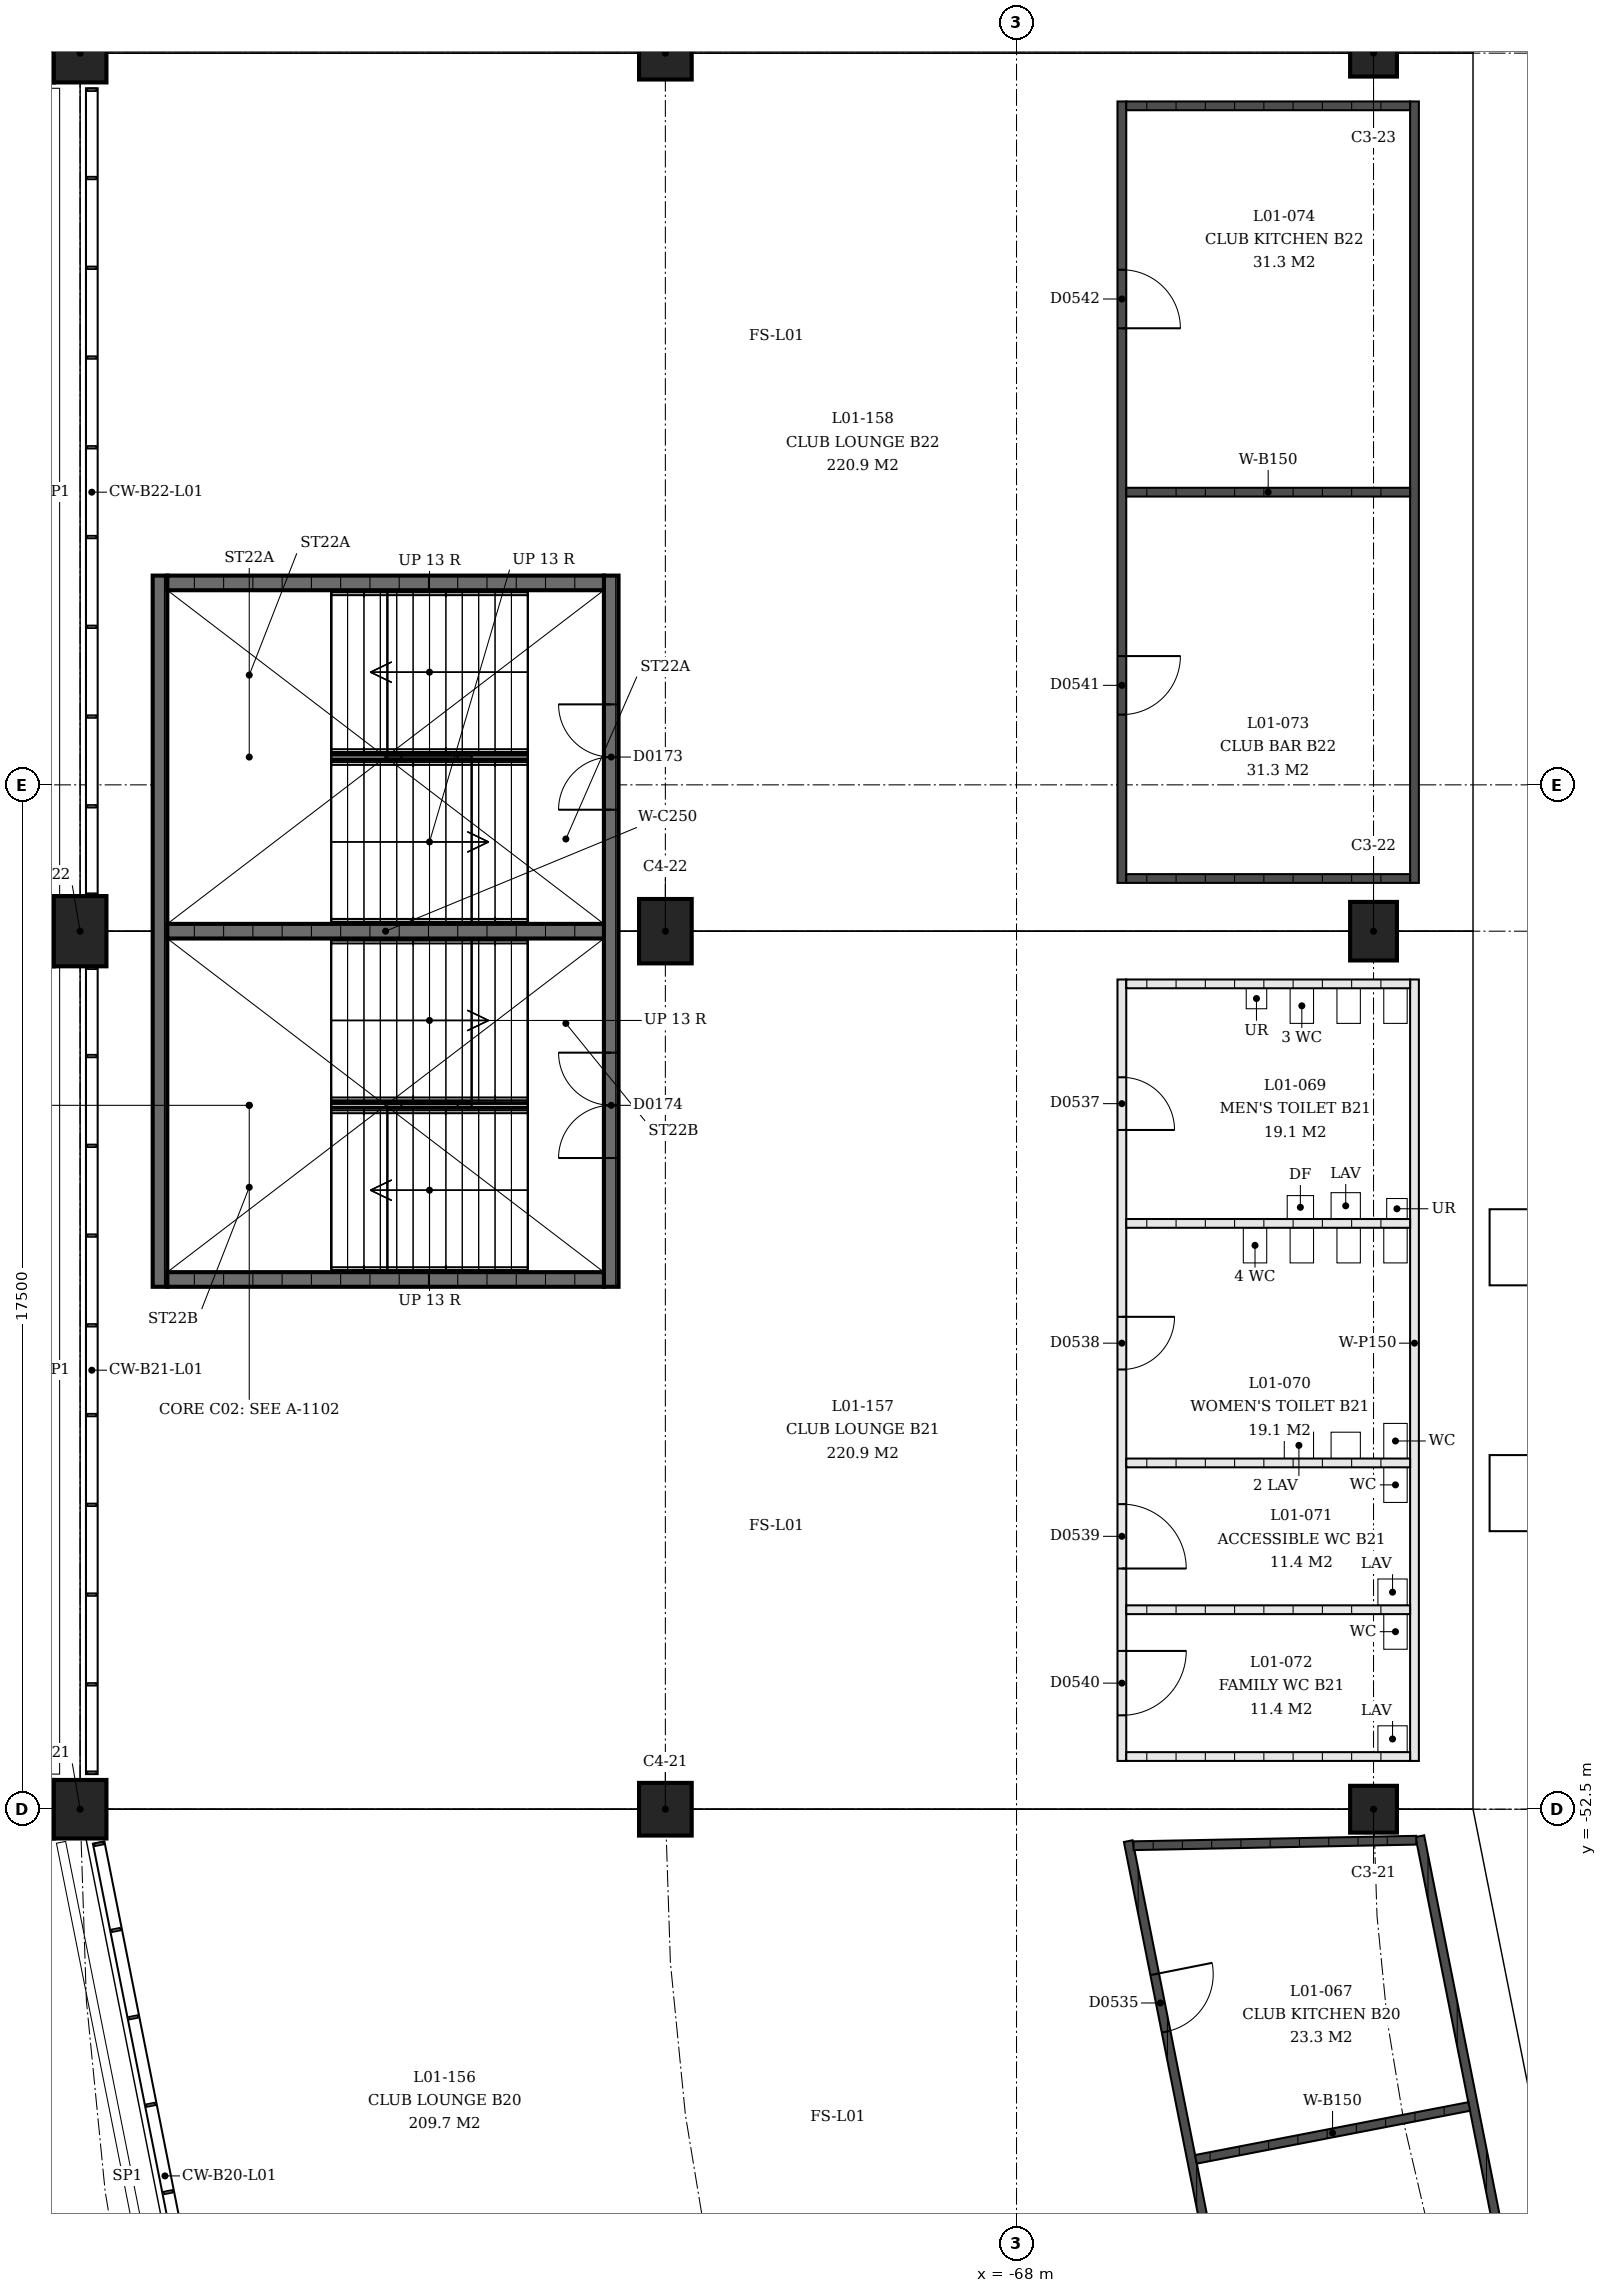
"""IFC4 building model, lengths in metres.
Left out: names, types, materials, properties, quantities, classifications, styles, units other than length and angle.
Written with IfcOpenShell. Run it as: python <this file> out.ifc"""

import sys

from ifc_helpers import new_model, si_unit, direction, frame, frame_2d, origin, origin_2d, place, context, subcontext, project, spatial, rectangle, extrude, element, fill, save


model = new_model("IFC4")
c1 = context("Model", 3, precision=1e-05, world=origin(), true_north=direction((0.0, 1.0)))
c2 = subcontext(c1, "Body", "Model", "MODEL_VIEW")
j1 = project(units=[si_unit("LENGTHUNIT", "METRE"), si_unit("PLANEANGLEUNIT", "RADIAN")], contexts=[c1])
p1 = place(None, origin())
s1 = spatial("IfcSite", under=j1, at=p1, CompositionType="ELEMENT")
p2 = place(p1, origin())
s2 = spatial("IfcBuilding", under=s1, at=p2, CompositionType="ELEMENT")
p3 = place(p2, frame((0.0, 0.0, 4.5)))
s3 = spatial("IfcBuildingStorey", under=s2, at=p3, CompositionType="ELEMENT", Elevation=4.5)
p4 = place(p3, frame((-61.9, -52.5, 0.0), z_axis=(0.0, 0.0, 1.0), x_axis=(0.0, -1.0, 0.0)))
e1 = element("IfcColumn", 1, at=p4, inside=s3, PredefinedType="COLUMN", context=c2, shape_type="SweptSolid", body=[
    extrude(rectangle(XDim=0.8, YDim=0.8, at=origin_2d()), origin(), (0.0, 0.0, 1.0), 4.5),
])
p5 = place(p3, frame((-74.0, -52.5, 0.0), z_axis=(0.0, 0.0, 1.0), x_axis=(0.0, -1.0, 0.0)))
e2 = element("IfcColumn", 2, at=p5, inside=s3, PredefinedType="COLUMN", context=c2, shape_type="SweptSolid", body=[
    extrude(rectangle(XDim=0.9, YDim=0.9, at=origin_2d()), origin(), (0.0, 0.0, 1.0), 4.5),
])
p6 = place(p3, frame((-84.0, -52.5, 0.0), z_axis=(0.0, 0.0, 1.0), x_axis=(0.0, -1.0, 0.0)))
e3 = element("IfcColumn", 3, at=p6, inside=s3, PredefinedType="COLUMN", context=c2, shape_type="SweptSolid", body=[
    extrude(rectangle(XDim=1.0, YDim=0.9, at=origin_2d()), origin(), (0.0, 0.0, 1.0), 4.5),
])
p7 = place(p3, frame((-61.9, -37.5, 0.0), z_axis=(0.0, 0.0, 1.0), x_axis=(0.0, -1.0, 0.0)))
e4 = element("IfcColumn", 4, at=p7, inside=s3, PredefinedType="COLUMN", context=c2, shape_type="SweptSolid", body=[
    extrude(rectangle(XDim=1.0, YDim=0.8, at=origin_2d()), origin(), (0.0, 0.0, 1.0), 4.5),
])
p8 = place(p3, frame((-74.0, -37.5, 0.0), z_axis=(0.0, 0.0, 1.0), x_axis=(0.0, -1.0, 0.0)))
e5 = element("IfcColumn", 5, at=p8, inside=s3, PredefinedType="COLUMN", context=c2, shape_type="SweptSolid", body=[
    extrude(rectangle(XDim=1.1, YDim=0.9, at=origin_2d()), origin(), (0.0, 0.0, 1.0), 4.5),
])
p9 = place(p3, frame((-84.0, -37.5, 0.0), z_axis=(0.0, 0.0, 1.0), x_axis=(0.0, -1.0, 0.0)))
e6 = element("IfcColumn", 6, at=p9, inside=s3, PredefinedType="COLUMN", context=c2, shape_type="SweptSolid", body=[
    extrude(rectangle(XDim=1.2, YDim=0.9, at=origin_2d()), origin(), (0.0, 0.0, 1.0), 4.5),
])
p10 = place(p3, frame((-61.9, -22.5, 0.0), z_axis=(0.0, 0.0, 1.0), x_axis=(0.0, -1.0, 0.0)))
e7 = element("IfcColumn", 7, at=p10, inside=s3, PredefinedType="COLUMN", context=c2, shape_type="SweptSolid", body=[
    extrude(rectangle(XDim=0.8, YDim=0.8, at=origin_2d()), origin(), (0.0, 0.0, 1.0), 4.5),
])
p11 = place(p3, frame((-74.0, -22.5, 0.0), z_axis=(0.0, 0.0, 1.0), x_axis=(0.0, -1.0, 0.0)))
e8 = element("IfcColumn", 8, at=p11, inside=s3, PredefinedType="COLUMN", context=c2, shape_type="SweptSolid", body=[
    extrude(rectangle(XDim=0.9, YDim=0.9, at=origin_2d()), origin(), (0.0, 0.0, 1.0), 4.5),
])
p12 = place(p3, frame((-84.0, -22.5, 0.0), z_axis=(0.0, 0.0, 1.0), x_axis=(0.0, -1.0, 0.0)))
e9 = element("IfcColumn", 9, at=p12, inside=s3, PredefinedType="COLUMN", context=c2, shape_type="SweptSolid", body=[
    extrude(rectangle(XDim=1.0, YDim=0.9, at=origin_2d()), origin(), (0.0, 0.0, 1.0), 4.5),
])
p13 = place(p3, frame((-74.925, -31.425, 0.0), z_axis=(0.0, 0.0, 1.0), x_axis=(0.0, -1.0, 0.0)))
e10 = element("IfcWall", 10, at=p13, inside=s3, PredefinedType="SHEAR", context=c2, shape_type="SweptSolid", body=[
    extrude(rectangle(XDim=12.15, YDim=0.25, at=frame_2d((6.075, 0.0))), origin(), (0.0, 0.0, 1.0), 4.09),
])
p14 = place(p13, frame((2.2, 0.0, 0.0)))
e11 = element("IfcOpeningElement", 11, at=p14, cuts=e10, PredefinedType="OPENING", context=c2, shape_type="SweptSolid", body=[
    extrude(rectangle(XDim=1.8, YDim=2.1, at=frame_2d((0.9, 1.05))), frame((0.0, 0.125, 0.0), z_axis=(0.0, -1.0, 0.0), x_axis=(1.0, 0.0, 0.0)), (0.0, 0.0, 1.0), 0.25),
])
p15 = place(p13, frame((8.15, 0.0, 0.0)))
e12 = element("IfcOpeningElement", 12, at=p15, cuts=e10, PredefinedType="OPENING", context=c2, shape_type="SweptSolid", body=[
    extrude(rectangle(XDim=1.8, YDim=2.1, at=frame_2d((0.9, 1.05))), frame((0.0, 0.125, 0.0), z_axis=(0.0, -1.0, 0.0), x_axis=(1.0, 0.0, 0.0)), (0.0, 0.0, 1.0), 0.25),
])
p16 = place(p3, frame((-82.635, -31.425, 0.0), z_axis=(0.0, 0.0, 1.0), x_axis=(0.0, -1.0, 0.0)))
e13 = element("IfcWall", 13, at=p16, inside=s3, PredefinedType="SHEAR", context=c2, shape_type="SweptSolid", body=[
    extrude(rectangle(XDim=12.15, YDim=0.25, at=frame_2d((6.075, 0.0))), origin(), (0.0, 0.0, 1.0), 4.09),
])
for number, where, z_axis, x_axis in (
    (14, (-75.05, -31.55, 0.0), (0.0, 0.0, 1.0), (-1.0, 0.0, 0.0)),
    (15, (-75.05, -43.45, 0.0), (0.0, 0.0, 1.0), (-1.0, 0.0, 0.0)),
    (16, (-75.05, -37.5, 0.0), (0.0, 0.0, 1.0), (-1.0, 0.0, 0.0)),
):
    element("IfcWall", number, at=place(p3, frame(where, z_axis=z_axis, x_axis=x_axis)), inside=s3, PredefinedType="SHEAR", context=c2, shape_type="SweptSolid", body=[
        extrude(rectangle(XDim=7.46, YDim=0.25, at=frame_2d((3.73, 0.0))), origin(), (0.0, 0.0, 1.0), 4.09),
    ])
p17 = place(p3, frame((-59.277, -62.168, 0.0), z_axis=(0.0, 0.0, 1.0), x_axis=(-0.195100776204, 0.980783200878, 0.0)))
e17 = element("IfcWall", 17, at=p17, inside=s3, PredefinedType="SOLIDWALL", context=c2, shape_type="SweptSolid", body=[
    extrude(rectangle(XDim=9.388, YDim=0.15, at=frame_2d((4.694, 0.0))), origin(), (0.0, 0.0, 1.0), 3.0),
])
p18 = place(p3, frame((-63.923, -63.945, 0.0), z_axis=(0.0, 0.0, 1.0), x_axis=(-0.195102100298, 0.980782937484, 0.0)))
e18 = element("IfcWall", 18, at=p18, inside=s3, PredefinedType="SOLIDWALL", context=c2, shape_type="SweptSolid", body=[
    extrude(rectangle(XDim=11.113, YDim=0.15, at=frame_2d((5.557, 0.0))), origin(), (0.0, 0.0, 1.0), 3.0),
])
p19 = place(p18, frame((2.319, 0.0, 0.0)))
e19 = element("IfcOpeningElement", 19, at=p19, cuts=e18, PredefinedType="OPENING", context=c2, shape_type="SweptSolid", body=[
    extrude(rectangle(XDim=1.0, YDim=2.1, at=frame_2d((0.5, 1.05))), frame((0.0, 0.075, 0.0), z_axis=(0.0, -1.0, 0.0), x_axis=(1.0, 0.0, 0.0)), (0.0, 0.0, 1.0), 0.15),
])
p20 = place(p18, frame((7.794, 0.0, 0.0)))
e20 = element("IfcOpeningElement", 20, at=p20, cuts=e18, PredefinedType="OPENING", context=c2, shape_type="SweptSolid", body=[
    extrude(rectangle(XDim=1.0, YDim=2.1, at=frame_2d((0.5, 1.05))), frame((0.0, 0.075, 0.0), z_axis=(0.0, -1.0, 0.0), x_axis=(1.0, 0.0, 0.0)), (0.0, 0.0, 1.0), 0.15),
])
p21 = place(p3, frame((-60.265, -57.578, 0.0), z_axis=(0.0, 0.0, 1.0), x_axis=(-0.981823683867, -0.189795294456, 0.0)))
e21 = element("IfcWall", 21, at=p21, inside=s3, PredefinedType="SOLIDWALL", context=c2, shape_type="SweptSolid", body=[
    extrude(rectangle(XDim=4.757, YDim=0.15, at=frame_2d((2.378, 0.0))), origin(), (0.0, 0.0, 1.0), 3.0),
])
p22 = place(p3, frame((-61.17, -53.03, 0.0), z_axis=(0.0, 0.0, 1.0), x_axis=(-0.999810800275, -0.01945157199, 0.0)))
e22 = element("IfcWall", 22, at=p22, inside=s3, PredefinedType="SOLIDWALL", context=c2, shape_type="SweptSolid", body=[
    extrude(rectangle(XDim=4.832, YDim=0.15, at=frame_2d((2.416, 0.0))), origin(), (0.0, 0.0, 1.0), 3.0),
])
p23 = place(p3, frame((-61.2, -38.325, 0.0), z_axis=(0.0, 0.0, 1.0), x_axis=(0.0, -1.0, 0.0)))
e23 = element("IfcWall", 23, at=p23, inside=s3, PredefinedType="PARTITIONING", context=c2, shape_type="SweptSolid", body=[
    extrude(rectangle(XDim=13.35, YDim=0.15, at=frame_2d((6.675, 0.0))), origin(), (0.0, 0.0, 1.0), 3.0),
])
p24 = place(p3, frame((-66.2, -38.325, 0.0), z_axis=(0.0, 0.0, 1.0), x_axis=(0.0, -1.0, 0.0)))
e24 = element("IfcWall", 24, at=p24, inside=s3, PredefinedType="PARTITIONING", context=c2, shape_type="SweptSolid", body=[
    extrude(rectangle(XDim=13.35, YDim=0.15, at=frame_2d((6.675, 0.0))), origin(), (0.0, 0.0, 1.0), 3.0),
])
p25 = place(p24, frame((1.671, 0.0, 0.0)))
e25 = element("IfcOpeningElement", 25, at=p25, cuts=e24, PredefinedType="OPENING", context=c2, shape_type="SweptSolid", body=[
    extrude(rectangle(XDim=0.9, YDim=2.1, at=frame_2d((0.45, 1.05))), frame((0.0, 0.075, 0.0), z_axis=(0.0, -1.0, 0.0), x_axis=(1.0, 0.0, 0.0)), (0.0, 0.0, 1.0), 0.15),
])
p26 = place(p24, frame((5.763, 0.0, 0.0)))
e26 = element("IfcOpeningElement", 26, at=p26, cuts=e24, PredefinedType="OPENING", context=c2, shape_type="SweptSolid", body=[
    extrude(rectangle(XDim=0.9, YDim=2.1, at=frame_2d((0.45, 1.05))), frame((0.0, 0.075, 0.0), z_axis=(0.0, -1.0, 0.0), x_axis=(1.0, 0.0, 0.0)), (0.0, 0.0, 1.0), 0.15),
])
p27 = place(p24, frame((8.963, 0.0, 0.0)))
e27 = element("IfcOpeningElement", 27, at=p27, cuts=e24, PredefinedType="OPENING", context=c2, shape_type="SweptSolid", body=[
    extrude(rectangle(XDim=1.1, YDim=2.1, at=frame_2d((0.55, 1.05))), frame((0.0, 0.075, 0.0), z_axis=(0.0, -1.0, 0.0), x_axis=(1.0, 0.0, 0.0)), (0.0, 0.0, 1.0), 0.15),
])
p28 = place(p24, frame((11.471, 0.0, 0.0)))
e28 = element("IfcOpeningElement", 28, at=p28, cuts=e24, PredefinedType="OPENING", context=c2, shape_type="SweptSolid", body=[
    extrude(rectangle(XDim=1.1, YDim=2.1, at=frame_2d((0.55, 1.05))), frame((0.0, 0.075, 0.0), z_axis=(0.0, -1.0, 0.0), x_axis=(1.0, 0.0, 0.0)), (0.0, 0.0, 1.0), 0.15),
])
for number, where, z_axis, x_axis in (
    (29, (-61.275, -38.4, 0.0), (0.0, 0.0, 1.0), (-1.0, 0.0, 0.0)),
    (30, (-61.275, -42.492, 0.0), (0.0, 0.0, 1.0), (-1.0, 0.0, 0.0)),
    (31, (-61.275, -46.584, 0.0), (0.0, 0.0, 1.0), (-1.0, 0.0, 0.0)),
    (32, (-61.275, -49.092, 0.0), (0.0, 0.0, 1.0), (-1.0, 0.0, 0.0)),
    (33, (-61.275, -51.6, 0.0), (0.0, 0.0, 1.0), (-1.0, 0.0, 0.0)),
):
    element("IfcWall", number, at=place(p3, frame(where, z_axis=z_axis, x_axis=x_axis)), inside=s3, PredefinedType="PARTITIONING", context=c2, shape_type="SweptSolid", body=[
        extrude(rectangle(XDim=4.85, YDim=0.15, at=frame_2d((2.425, 0.0))), origin(), (0.0, 0.0, 1.0), 3.0),
    ])
p29 = place(p3, frame((-61.2, -36.675, 0.0), z_axis=(0.0, 0.0, 1.0), x_axis=(0.0, 1.0, 0.0)))
e34 = element("IfcWall", 34, at=p29, inside=s3, PredefinedType="SOLIDWALL", context=c2, shape_type="SweptSolid", body=[
    extrude(rectangle(XDim=13.35, YDim=0.15, at=frame_2d((6.675, 0.0))), origin(), (0.0, 0.0, 1.0), 3.0),
])
p30 = place(p3, frame((-66.2, -36.675, 0.0), z_axis=(0.0, 0.0, 1.0), x_axis=(0.0, 1.0, 0.0)))
e35 = element("IfcWall", 35, at=p30, inside=s3, PredefinedType="SOLIDWALL", context=c2, shape_type="SweptSolid", body=[
    extrude(rectangle(XDim=13.35, YDim=0.15, at=frame_2d((6.675, 0.0))), origin(), (0.0, 0.0, 1.0), 3.0),
])
p31 = place(p30, frame((2.875, 0.0, 0.0)))
e36 = element("IfcOpeningElement", 36, at=p31, cuts=e35, PredefinedType="OPENING", context=c2, shape_type="SweptSolid", body=[
    extrude(rectangle(XDim=1.0, YDim=2.1, at=frame_2d((0.5, 1.05))), frame((0.0, 0.075, 0.0), z_axis=(0.0, -1.0, 0.0), x_axis=(1.0, 0.0, 0.0)), (0.0, 0.0, 1.0), 0.15),
])
p32 = place(p30, frame((9.475, 0.0, 0.0)))
e37 = element("IfcOpeningElement", 37, at=p32, cuts=e35, PredefinedType="OPENING", context=c2, shape_type="SweptSolid", body=[
    extrude(rectangle(XDim=1.0, YDim=2.1, at=frame_2d((0.5, 1.05))), frame((0.0, 0.075, 0.0), z_axis=(0.0, -1.0, 0.0), x_axis=(1.0, 0.0, 0.0)), (0.0, 0.0, 1.0), 0.15),
])
for number, where, z_axis, x_axis in (
    (38, (-61.275, -36.6, 0.0), (0.0, 0.0, 1.0), (-1.0, 0.0, 0.0)),
    (39, (-61.275, -30.0, 0.0), (0.0, 0.0, 1.0), (-1.0, 0.0, 0.0)),
    (40, (-61.275, -23.4, 0.0), (0.0, 0.0, 1.0), (-1.0, 0.0, 0.0)),
):
    element("IfcWall", number, at=place(p3, frame(where, z_axis=z_axis, x_axis=x_axis)), inside=s3, PredefinedType="SOLIDWALL", context=c2, shape_type="SweptSolid", body=[
        extrude(rectangle(XDim=4.85, YDim=0.15, at=frame_2d((2.425, 0.0))), origin(), (0.0, 0.0, 1.0), 3.0),
    ])
p33 = place(p14, origin())
e41 = element("IfcDoor", 41, at=p33, inside=s3, OperationType="DOUBLE_DOOR_SINGLE_SWING", PredefinedType="DOOR", context=c2, shape_type="SweptSolid", body=[
    extrude(rectangle(XDim=1.8, YDim=2.1, at=frame_2d((0.9, 1.05))), frame((0.0, 0.025, 0.0), z_axis=(0.0, -1.0, 0.0), x_axis=(1.0, 0.0, 0.0)), (0.0, 0.0, 1.0), 0.05),
])
fill(e11, e41)
p34 = place(p15, origin())
e42 = element("IfcDoor", 42, at=p34, inside=s3, OperationType="DOUBLE_DOOR_SINGLE_SWING", PredefinedType="DOOR", context=c2, shape_type="SweptSolid", body=[
    extrude(rectangle(XDim=1.8, YDim=2.1, at=frame_2d((0.9, 1.05))), frame((0.0, 0.025, 0.0), z_axis=(0.0, -1.0, 0.0), x_axis=(1.0, 0.0, 0.0)), (0.0, 0.0, 1.0), 0.05),
])
fill(e12, e42)
p35 = place(p20, origin())
e43 = element("IfcDoor", 43, at=p35, inside=s3, OperationType="SINGLE_SWING_RIGHT", PredefinedType="DOOR", context=c2, shape_type="SweptSolid", body=[
    extrude(rectangle(XDim=1.0, YDim=2.1, at=frame_2d((0.5, 1.05))), frame((0.0, 0.025, 0.0), z_axis=(0.0, -1.0, 0.0), x_axis=(1.0, 0.0, 0.0)), (0.0, 0.0, 1.0), 0.05),
])
fill(e20, e43)
p36 = place(p25, origin())
e44 = element("IfcDoor", 44, at=p36, inside=s3, OperationType="SINGLE_SWING_LEFT", PredefinedType="DOOR", context=c2, shape_type="SweptSolid", body=[
    extrude(rectangle(XDim=0.9, YDim=2.1, at=frame_2d((0.45, 1.05))), frame((0.0, 0.025, 0.0), z_axis=(0.0, -1.0, 0.0), x_axis=(1.0, 0.0, 0.0)), (0.0, 0.0, 1.0), 0.05),
])
fill(e25, e44)
p37 = place(p26, origin())
e45 = element("IfcDoor", 45, at=p37, inside=s3, OperationType="SINGLE_SWING_RIGHT", PredefinedType="DOOR", context=c2, shape_type="SweptSolid", body=[
    extrude(rectangle(XDim=0.9, YDim=2.1, at=frame_2d((0.45, 1.05))), frame((0.0, 0.025, 0.0), z_axis=(0.0, -1.0, 0.0), x_axis=(1.0, 0.0, 0.0)), (0.0, 0.0, 1.0), 0.05),
])
fill(e26, e45)
p38 = place(p27, origin())
e46 = element("IfcDoor", 46, at=p38, inside=s3, OperationType="SINGLE_SWING_LEFT", PredefinedType="DOOR", context=c2, shape_type="SweptSolid", body=[
    extrude(rectangle(XDim=1.1, YDim=2.1, at=frame_2d((0.55, 1.05))), frame((0.0, 0.025, 0.0), z_axis=(0.0, -1.0, 0.0), x_axis=(1.0, 0.0, 0.0)), (0.0, 0.0, 1.0), 0.05),
])
fill(e27, e46)
p39 = place(p28, origin())
e47 = element("IfcDoor", 47, at=p39, inside=s3, OperationType="SINGLE_SWING_RIGHT", PredefinedType="DOOR", context=c2, shape_type="SweptSolid", body=[
    extrude(rectangle(XDim=1.1, YDim=2.1, at=frame_2d((0.55, 1.05))), frame((0.0, 0.025, 0.0), z_axis=(0.0, -1.0, 0.0), x_axis=(1.0, 0.0, 0.0)), (0.0, 0.0, 1.0), 0.05),
])
fill(e28, e47)
p40 = place(p31, origin())
e48 = element("IfcDoor", 48, at=p40, inside=s3, OperationType="SINGLE_SWING_RIGHT", PredefinedType="DOOR", context=c2, shape_type="SweptSolid", body=[
    extrude(rectangle(XDim=1.0, YDim=2.1, at=frame_2d((0.5, 1.05))), frame((0.0, 0.025, 0.0), z_axis=(0.0, -1.0, 0.0), x_axis=(1.0, 0.0, 0.0)), (0.0, 0.0, 1.0), 0.05),
])
fill(e36, e48)
p41 = place(p32, origin())
e49 = element("IfcDoor", 49, at=p41, inside=s3, OperationType="SINGLE_SWING_LEFT", PredefinedType="DOOR", context=c2, shape_type="SweptSolid", body=[
    extrude(rectangle(XDim=1.0, YDim=2.1, at=frame_2d((0.5, 1.05))), frame((0.0, 0.025, 0.0), z_axis=(0.0, -1.0, 0.0), x_axis=(1.0, 0.0, 0.0)), (0.0, 0.0, 1.0), 0.05),
])
fill(e37, e49)
save(model, sys.argv[1])
